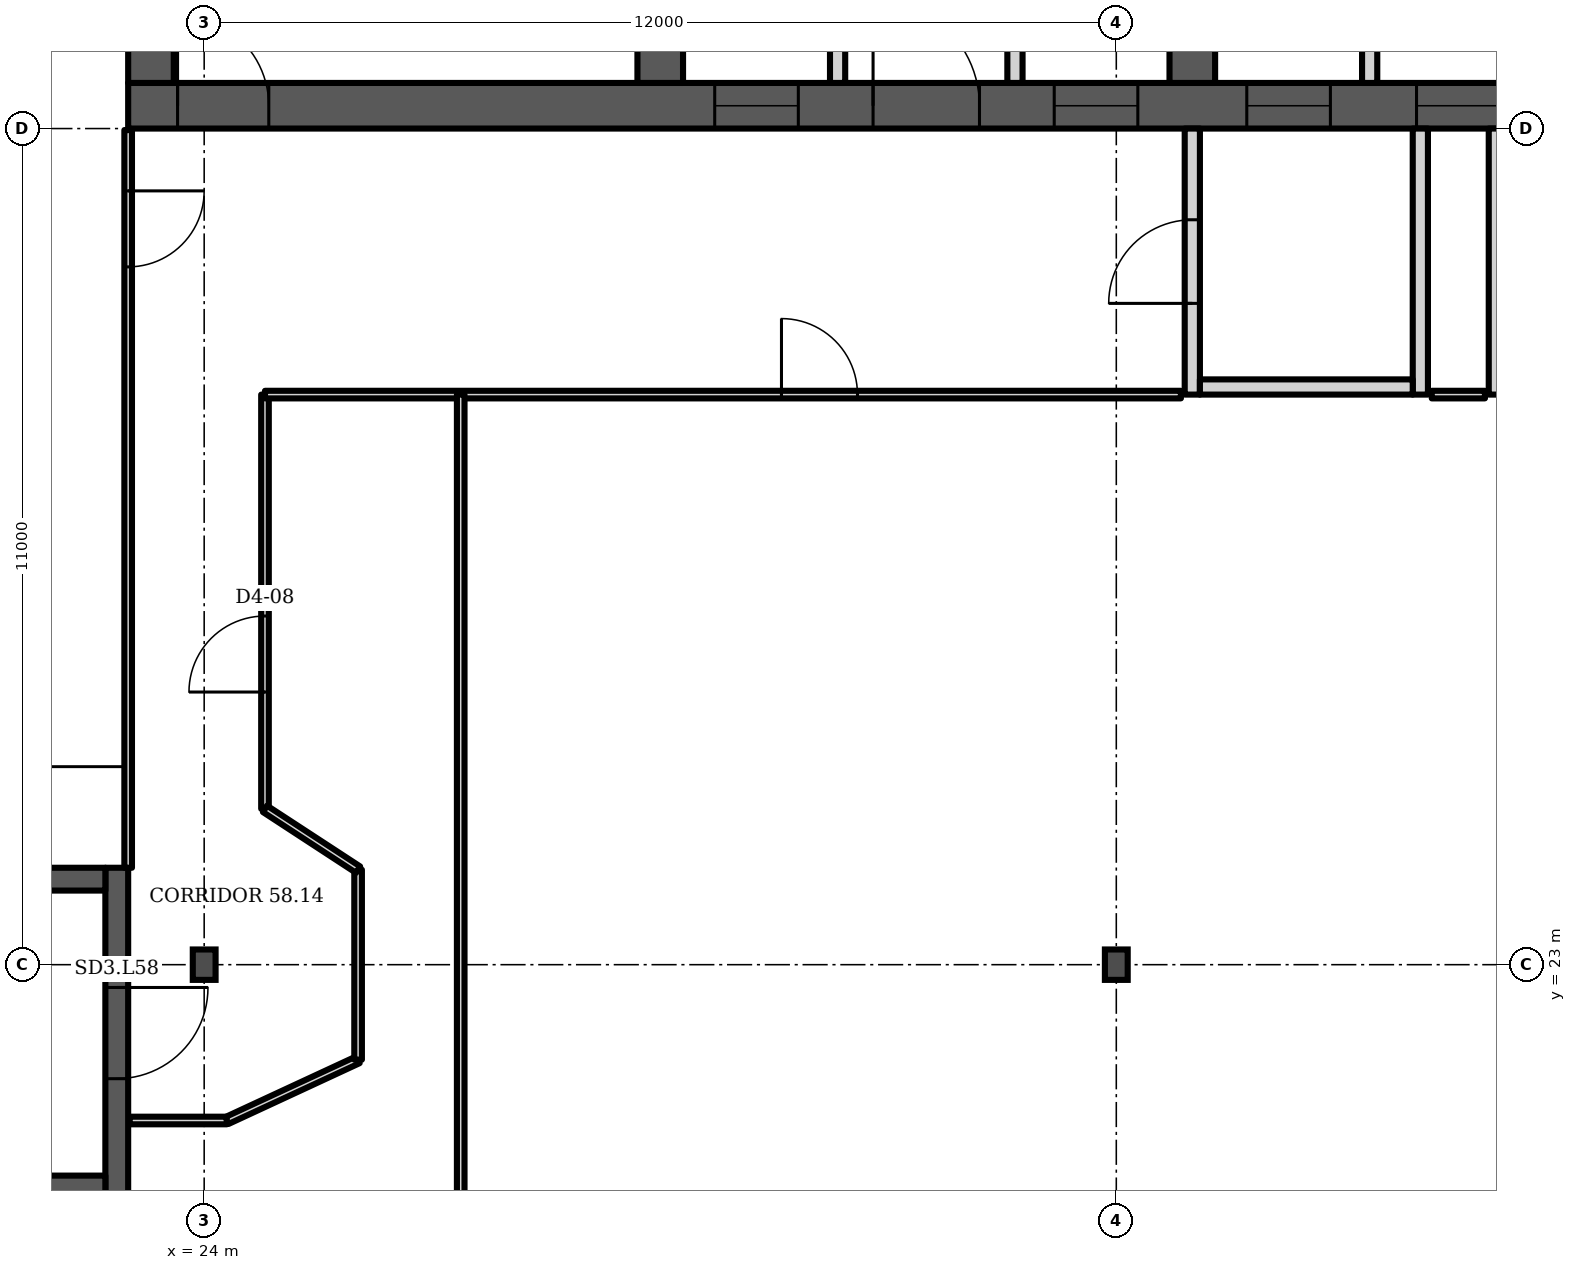
"""IFC4 building model, lengths in metres.
Left out: names, types, materials, properties, quantities, classifications, styles, units other than length and angle.
Written with IfcOpenShell. Run it as: python <this file> out.ifc"""

import sys

from ifc_helpers import new_model, si_unit, direction, frame, frame_2d, origin, origin_2d, place, context, subcontext, project, spatial, polyline, rectangle, i_section, outline, extrude, element, fill, save


model = new_model("IFC4")
c1 = context("Model", 3, precision=1e-05, world=origin(), true_north=direction((0.0, 1.0)))
c2 = subcontext(c1, "Body", "Model", "MODEL_VIEW")
j1 = project(units=[si_unit("LENGTHUNIT", "METRE"), si_unit("PLANEANGLEUNIT", "RADIAN")], contexts=[c1])
p1 = place(None, origin())
s1 = spatial("IfcSite", under=j1, at=p1, CompositionType="ELEMENT")
p2 = place(p1, origin())
s2 = spatial("IfcBuilding", under=s1, at=p2, CompositionType="ELEMENT")
p3 = place(p2, frame((0.0, 0.0, 232.3)))
s3 = spatial("IfcBuildingStorey", under=s2, at=p3, CompositionType="ELEMENT", Elevation=232.3)
p4 = place(p3, frame((23.0, 34.3, 0.0), z_axis=(0.0, 0.0, 1.0), x_axis=(1.0, 0.0, 0.0)))
e1 = element("IfcWall", 1, at=p4, inside=s3, PredefinedType="SHEAR", context=c2, shape_type="SweptSolid", body=[
    extrude(rectangle(XDim=35.0, YDim=0.6, at=frame_2d((17.5, 0.0))), origin(), (0.0, 0.0, 1.0), 3.6),
])
p5 = place(p4, frame((0.65, 0.0, 0.0)))
e2 = element("IfcOpeningElement", 2, at=p5, cuts=e1, PredefinedType="OPENING", context=c2, shape_type="SweptSolid", body=[
    extrude(rectangle(XDim=1.2, YDim=2.1, at=frame_2d((0.6, 1.05))), frame((0.0, 0.31, 0.0), z_axis=(0.0, -1.0, 0.0), x_axis=(1.0, 0.0, 0.0)), (0.0, 0.0, 1.0), 0.62),
])
p6 = place(p4, frame((7.717, 0.0, 0.0)))
e3 = element("IfcOpeningElement", 3, at=p6, cuts=e1, PredefinedType="OPENING", context=c2, shape_type="SweptSolid", body=[
    extrude(rectangle(XDim=1.1, YDim=2.1, at=frame_2d((0.55, 1.05))), frame((0.0, 0.31, 0.0), z_axis=(0.0, -1.0, 0.0), x_axis=(1.0, 0.0, 0.0)), (0.0, 0.0, 1.0), 0.62),
])
p7 = place(p4, frame((12.183, 0.0, 0.0)))
e4 = element("IfcOpeningElement", 4, at=p7, cuts=e1, PredefinedType="OPENING", context=c2, shape_type="SweptSolid", body=[
    extrude(rectangle(XDim=1.1, YDim=2.1, at=frame_2d((0.55, 1.05))), frame((0.0, 0.31, 0.0), z_axis=(0.0, -1.0, 0.0), x_axis=(1.0, 0.0, 0.0)), (0.0, 0.0, 1.0), 0.62),
])
p8 = place(p4, frame((9.8, 0.0, 0.0)))
e5 = element("IfcOpeningElement", 5, at=p8, cuts=e1, PredefinedType="OPENING", context=c2, shape_type="SweptSolid", body=[
    extrude(rectangle(XDim=1.4, YDim=2.1, at=frame_2d((0.7, 1.05))), frame((0.0, 0.31, 0.0), z_axis=(0.0, -1.0, 0.0), x_axis=(1.0, 0.0, 0.0)), (0.0, 0.0, 1.0), 0.62),
])
p9 = place(p4, frame((14.717, 0.0, 0.0)))
e6 = element("IfcOpeningElement", 6, at=p9, cuts=e1, PredefinedType="OPENING", context=c2, shape_type="SweptSolid", body=[
    extrude(rectangle(XDim=1.1, YDim=2.1, at=frame_2d((0.55, 1.05))), frame((0.0, 0.31, 0.0), z_axis=(0.0, -1.0, 0.0), x_axis=(1.0, 0.0, 0.0)), (0.0, 0.0, 1.0), 0.62),
])
p10 = place(p4, frame((16.95, 0.0, 0.0)))
e7 = element("IfcOpeningElement", 7, at=p10, cuts=e1, PredefinedType="OPENING", context=c2, shape_type="SweptSolid", body=[
    extrude(rectangle(XDim=1.1, YDim=2.1, at=frame_2d((0.55, 1.05))), frame((0.0, 0.31, 0.0), z_axis=(0.0, -1.0, 0.0), x_axis=(1.0, 0.0, 0.0)), (0.0, 0.0, 1.0), 0.62),
])
p11 = place(p4, frame((19.183, 0.0, 0.0)))
e8 = element("IfcOpeningElement", 8, at=p11, cuts=e1, PredefinedType="OPENING", context=c2, shape_type="SweptSolid", body=[
    extrude(rectangle(XDim=1.1, YDim=2.1, at=frame_2d((0.55, 1.05))), frame((0.0, 0.31, 0.0), z_axis=(0.0, -1.0, 0.0), x_axis=(1.0, 0.0, 0.0)), (0.0, 0.0, 1.0), 0.62),
])
p12 = place(p4, frame((26.15, 0.0, 0.0)))
e9 = element("IfcOpeningElement", 9, at=p12, cuts=e1, PredefinedType="OPENING", context=c2, shape_type="SweptSolid", body=[
    extrude(rectangle(XDim=1.2, YDim=2.1, at=frame_2d((0.6, 1.05))), frame((0.0, 0.31, 0.0), z_axis=(0.0, -1.0, 0.0), x_axis=(1.0, 0.0, 0.0)), (0.0, 0.0, 1.0), 0.62),
])
p13 = place(p4, frame((28.767, 0.0, 0.0)))
e10 = element("IfcOpeningElement", 10, at=p13, cuts=e1, PredefinedType="OPENING", context=c2, shape_type="SweptSolid", body=[
    extrude(rectangle(XDim=1.0, YDim=2.1, at=frame_2d((0.5, 1.05))), frame((0.0, 0.31, 0.0), z_axis=(0.0, -1.0, 0.0), x_axis=(1.0, 0.0, 0.0)), (0.0, 0.0, 1.0), 0.62),
])
p14 = place(p4, frame((33.083, 0.0, 0.0)))
e11 = element("IfcOpeningElement", 11, at=p14, cuts=e1, PredefinedType="OPENING", context=c2, shape_type="SweptSolid", body=[
    extrude(rectangle(XDim=1.0, YDim=2.1, at=frame_2d((0.5, 1.05))), frame((0.0, 0.31, 0.0), z_axis=(0.0, -1.0, 0.0), x_axis=(1.0, 0.0, 0.0)), (0.0, 0.0, 1.0), 0.62),
])
p15 = place(p4, frame((30.8, 0.0, 0.0)))
e12 = element("IfcOpeningElement", 12, at=p15, cuts=e1, PredefinedType="OPENING", context=c2, shape_type="SweptSolid", body=[
    extrude(rectangle(XDim=1.4, YDim=2.1, at=frame_2d((0.7, 1.05))), frame((0.0, 0.31, 0.0), z_axis=(0.0, -1.0, 0.0), x_axis=(1.0, 0.0, 0.0)), (0.0, 0.0, 1.0), 0.62),
])
p16 = place(p3, frame((23.3, 34.6, 0.0), z_axis=(0.0, 0.0, 1.0), x_axis=(0.0, 1.0, 0.0)))
e13 = element("IfcWall", 13, at=p16, inside=s3, PredefinedType="SHEAR", context=c2, shape_type="SweptSolid", body=[
    extrude(rectangle(XDim=13.585, YDim=0.6, at=frame_2d((6.792, 0.0))), origin(), (0.0, 0.0, 1.0), 3.6),
])
p17 = place(p3, frame((30.0, 34.6, 0.0), z_axis=(0.0, 0.0, 1.0), x_axis=(0.0, 1.0, 0.0)))
e14 = element("IfcWall", 14, at=p17, inside=s3, PredefinedType="SHEAR", context=c2, shape_type="SweptSolid", body=[
    extrude(rectangle(XDim=14.171, YDim=0.6, at=frame_2d((7.085, 0.0))), origin(), (0.0, 0.0, 1.0), 3.6),
])
p18 = place(p17, frame((3.8, 0.0, 0.0)))
e15 = element("IfcOpeningElement", 15, at=p18, cuts=e14, PredefinedType="OPENING", context=c2, shape_type="SweptSolid", body=[
    extrude(rectangle(XDim=1.1, YDim=2.1, at=frame_2d((0.55, 1.05))), frame((0.0, 0.31, 0.0), z_axis=(0.0, -1.0, 0.0), x_axis=(1.0, 0.0, 0.0)), (0.0, 0.0, 1.0), 0.62),
])
p19 = place(p3, frame((37.0, 34.6, 0.0), z_axis=(0.0, 0.0, 1.0), x_axis=(0.0, 1.0, 0.0)))
e16 = element("IfcWall", 16, at=p19, inside=s3, PredefinedType="SHEAR", context=c2, shape_type="SweptSolid", body=[
    extrude(rectangle(XDim=14.784, YDim=0.6, at=frame_2d((7.392, 0.0))), origin(), (0.0, 0.0, 1.0), 3.6),
])
p20 = place(p19, frame((11.302, 0.0, 0.0)))
e17 = element("IfcOpeningElement", 17, at=p20, cuts=e16, PredefinedType="OPENING", context=c2, shape_type="SweptSolid", body=[
    extrude(rectangle(XDim=1.0, YDim=2.1, at=frame_2d((0.5, 1.05))), frame((0.0, 0.31, 0.0), z_axis=(0.0, -1.0, 0.0), x_axis=(1.0, 0.0, 0.0)), (0.0, 0.0, 1.0), 0.62),
])
p21 = place(p19, frame((3.8, 0.0, 0.0)))
e18 = element("IfcOpeningElement", 18, at=p21, cuts=e16, PredefinedType="OPENING", context=c2, shape_type="SweptSolid", body=[
    extrude(rectangle(XDim=1.1, YDim=2.1, at=frame_2d((0.55, 1.05))), frame((0.0, 0.31, 0.0), z_axis=(0.0, -1.0, 0.0), x_axis=(1.0, 0.0, 0.0)), (0.0, 0.0, 1.0), 0.62),
])
for number, where, z_axis, x_axis in (
    (19, (24.0, 23.0, 0.0), (0.0, 0.0, 1.0), (1.0, 0.0, 0.0)),
    (20, (36.0, 23.0, 0.0), (0.0, 0.0, 1.0), (1.0, 0.0, 0.0)),
):
    element("IfcColumn", number, at=place(p3, frame(where, z_axis=z_axis, x_axis=x_axis)), inside=s3, PredefinedType="COLUMN", context=c2, shape_type="SweptSolid", body=[
        extrude(i_section(OverallWidth=0.3, OverallDepth=0.4, WebThickness=0.013, FlangeThickness=0.024, FilletRadius=0.027, at=origin_2d()), origin(), (0.0, 0.0, 1.0), 3.6),
    ])
p22 = place(p3, frame((0.0, 0.0, -0.0)))
e21 = element("IfcWall", 21, at=p22, inside=s3, PredefinedType="PARTITIONING", context=c2, shape_type="SweptSolid", body=[
    extrude(outline(polyline([(32.233, 37.45), (30.3, 37.45), (30.3, 37.65), (32.233, 37.65), (32.433, 37.65), (32.433, 34.6), (32.233, 34.6), (32.233, 37.45)])), origin(), (0.0, 0.0, 1.0), 3.2),
])
p23 = place(p3, frame((0.0, 0.0, -0.0)))
e22 = element("IfcWall", 22, at=p23, inside=s3, PredefinedType="PARTITIONING", context=c2, shape_type="SweptSolid", body=[
    extrude(outline(polyline([(34.567, 37.65), (34.767, 37.65), (36.7, 37.65), (36.7, 37.45), (34.767, 37.45), (34.767, 34.6), (34.567, 34.6), (34.567, 37.65)])), origin(), (0.0, 0.0, 1.0), 3.2),
])
p24 = place(p3, frame((0.0, 0.0, -0.0)))
e23 = element("IfcWall", 23, at=p24, inside=s3, PredefinedType="PARTITIONING", context=c2, shape_type="SweptSolid", body=[
    extrude(outline(polyline([(41.567, 37.1), (39.433, 37.1), (39.433, 34.6), (39.233, 34.6), (39.233, 37.45), (37.3, 37.45), (37.3, 37.65), (39.233, 37.65), (39.433, 37.65), (39.433, 37.3), (41.567, 37.3), (41.567, 37.35), (41.767, 37.35), (43.7, 37.35), (43.7, 37.15), (41.767, 37.15), (41.767, 34.6), (41.567, 34.6), (41.567, 37.1)])), origin(), (0.0, 0.0, 1.0), 3.2),
])
p25 = place(p3, frame((37.0, 30.5, 0.0), z_axis=(0.0, 0.0, 1.0), x_axis=(0.0, 1.0, 0.0)))
e24 = element("IfcWall", 24, at=p25, inside=s3, PredefinedType="PARTITIONING", context=c2, shape_type="SweptSolid", body=[
    extrude(rectangle(XDim=3.5, YDim=0.2, at=frame_2d((1.75, 0.0))), origin(), (0.0, 0.0, 1.0), 3.2),
])
p26 = place(p25, frame((1.2, 0.0, 0.0)))
e25 = element("IfcOpeningElement", 25, at=p26, cuts=e24, PredefinedType="OPENING", context=c2, shape_type="SweptSolid", body=[
    extrude(rectangle(XDim=1.1, YDim=2.1, at=frame_2d((0.55, 1.05))), frame((0.0, 0.11, 0.0), z_axis=(0.0, -1.0, 0.0), x_axis=(1.0, 0.0, 0.0)), (0.0, 0.0, 1.0), 0.22),
])
p27 = place(p3, frame((40.0, 30.5, 0.0), z_axis=(0.0, 0.0, 1.0), x_axis=(0.0, 1.0, 0.0)))
e26 = element("IfcWall", 26, at=p27, inside=s3, PredefinedType="PARTITIONING", context=c2, shape_type="SweptSolid", body=[
    extrude(rectangle(XDim=3.5, YDim=0.2, at=frame_2d((1.75, 0.0))), origin(), (0.0, 0.0, 1.0), 3.2),
])
p28 = place(p3, frame((37.1, 30.6, 0.0), z_axis=(0.0, 0.0, 1.0), x_axis=(1.0, 0.0, 0.0)))
e27 = element("IfcWall", 27, at=p28, inside=s3, PredefinedType="PARTITIONING", context=c2, shape_type="SweptSolid", body=[
    extrude(rectangle(XDim=2.8, YDim=0.2, at=frame_2d((1.4, 0.0))), origin(), (0.0, 0.0, 1.0), 3.2),
])
p29 = place(p3, frame((41.0, 30.5, 0.0), z_axis=(0.0, 0.0, 1.0), x_axis=(0.0, 1.0, 0.0)))
e28 = element("IfcWall", 28, at=p29, inside=s3, PredefinedType="PARTITIONING", context=c2, shape_type="SweptSolid", body=[
    extrude(rectangle(XDim=3.5, YDim=0.2, at=frame_2d((1.75, 0.0))), origin(), (0.0, 0.0, 1.0), 3.2),
])
p30 = place(p3, frame((22.85, 19.925, 0.0), z_axis=(0.0, 0.0, 1.0), x_axis=(0.0, 1.0, 0.0)))
e29 = element("IfcWall", 29, at=p30, inside=s3, PredefinedType="SHEAR", context=c2, shape_type="SweptSolid", body=[
    extrude(rectangle(XDim=4.35, YDim=0.3, at=frame_2d((2.175, 0.0))), origin(), (0.0, 0.0, 1.0), 3.2),
])
p31 = place(p30, frame((1.575, 0.0, 0.0)))
e30 = element("IfcOpeningElement", 30, at=p31, cuts=e29, PredefinedType="OPENING", context=c2, shape_type="SweptSolid", body=[
    extrude(rectangle(XDim=1.2, YDim=2.1, at=frame_2d((0.6, 1.05))), frame((0.0, 0.16, 0.0), z_axis=(0.0, -1.0, 0.0), x_axis=(1.0, 0.0, 0.0)), (0.0, 0.0, 1.0), 0.32),
])
p32 = place(p3, frame((23.0, 24.275, 0.0), z_axis=(0.0, 0.0, 1.0), x_axis=(0.0, 1.0, 0.0)))
e31 = element("IfcWall", 31, at=p32, inside=s3, PredefinedType="PARTITIONING", context=c2, shape_type="SweptSolid", body=[
    extrude(rectangle(XDim=9.705, YDim=0.1, at=frame_2d((4.853, 0.0))), origin(), (0.0, 0.0, 1.0), 3.2),
])
p33 = place(p32, frame((7.905, 0.0, 0.0)))
e32 = element("IfcOpeningElement", 32, at=p33, cuts=e31, PredefinedType="OPENING", context=c2, shape_type="SweptSolid", body=[
    extrude(rectangle(XDim=1.0, YDim=2.1, at=frame_2d((0.5, 1.05))), frame((0.0, 0.06, 0.0), z_axis=(0.0, -1.0, 0.0), x_axis=(1.0, 0.0, 0.0)), (0.0, 0.0, 1.0), 0.12),
])
p34 = place(p3, frame((23.02, 20.95, 0.0), z_axis=(0.0, 0.0, 1.0), x_axis=(1.0, 0.0, 0.0)))
e33 = element("IfcWall", 33, at=p34, inside=s3, PredefinedType="PARTITIONING", context=c2, shape_type="SweptSolid", body=[
    extrude(rectangle(XDim=1.28, YDim=0.1, at=frame_2d((0.64, 0.0))), origin(), (0.0, 0.0, 1.0), 3.2),
])
p35 = place(p3, frame((24.3, 20.95, 0.0), z_axis=(0.0, 0.0, 1.0), x_axis=(0.907168, 0.420777, 0.0)))
e34 = element("IfcWall", 34, at=p35, inside=s3, PredefinedType="PARTITIONING", context=c2, shape_type="SweptSolid", body=[
    extrude(rectangle(XDim=1.901, YDim=0.1, at=frame_2d((0.951, 0.0))), origin(), (0.0, 0.0, 1.0), 3.2),
])
p36 = place(p3, frame((24.8, 25.05, 0.0), z_axis=(0.0, 0.0, 1.0), x_axis=(0.0, 1.0, 0.0)))
e35 = element("IfcWall", 35, at=p36, inside=s3, PredefinedType="PARTITIONING", context=c2, shape_type="SweptSolid", body=[
    extrude(rectangle(XDim=5.45, YDim=0.1, at=frame_2d((2.725, 0.0))), origin(), (0.0, 0.0, 1.0), 3.2),
])
p37 = place(p36, frame((1.537, 0.0, 0.0)))
e36 = element("IfcOpeningElement", 36, at=p37, cuts=e35, PredefinedType="OPENING", context=c2, shape_type="SweptSolid", body=[
    extrude(rectangle(XDim=1.0, YDim=2.1, at=frame_2d((0.5, 1.05))), frame((0.0, 0.06, 0.0), z_axis=(0.0, -1.0, 0.0), x_axis=(1.0, 0.0, 0.0)), (0.0, 0.0, 1.0), 0.12),
])
p38 = place(p3, frame((24.8, 30.5, 0.0), z_axis=(0.0, 0.0, 1.0), x_axis=(1.0, 0.0, 0.0)))
e37 = element("IfcWall", 37, at=p38, inside=s3, PredefinedType="PARTITIONING", context=c2, shape_type="SweptSolid", body=[
    extrude(rectangle(XDim=12.05, YDim=0.1, at=frame_2d((6.025, 0.0))), origin(), (0.0, 0.0, 1.0), 3.2),
])
p39 = place(p38, frame((6.795, 0.0, 0.0)))
e38 = element("IfcOpeningElement", 38, at=p39, cuts=e37, PredefinedType="OPENING", context=c2, shape_type="SweptSolid", body=[
    extrude(rectangle(XDim=1.0, YDim=2.1, at=frame_2d((0.5, 1.05))), frame((0.0, 0.06, 0.0), z_axis=(0.0, -1.0, 0.0), x_axis=(1.0, 0.0, 0.0)), (0.0, 0.0, 1.0), 0.12),
])
p40 = place(p3, frame((26.025, 21.75, 0.0), z_axis=(0.0, 0.0, 1.0), x_axis=(0.0, 1.0, 0.0)))
e39 = element("IfcWall", 39, at=p40, inside=s3, PredefinedType="PARTITIONING", context=c2, shape_type="SweptSolid", body=[
    extrude(rectangle(XDim=2.5, YDim=0.1, at=frame_2d((1.25, 0.0))), origin(), (0.0, 0.0, 1.0), 3.2),
])
p41 = place(p3, frame((26.025, 24.25, 0.0), z_axis=(0.0, 0.0, 1.0), x_axis=(-0.837222, 0.546856, 0.0)))
e40 = element("IfcWall", 40, at=p41, inside=s3, PredefinedType="PARTITIONING", context=c2, shape_type="SweptSolid", body=[
    extrude(rectangle(XDim=1.463, YDim=0.1, at=frame_2d((0.731, 0.0))), origin(), (0.0, 0.0, 1.0), 3.2),
])
p42 = place(p3, frame((27.375, 5.915, 0.0), z_axis=(0.0, 0.0, 1.0), x_axis=(0.0, 1.0, 0.0)))
e41 = element("IfcWall", 41, at=p42, inside=s3, PredefinedType="PARTITIONING", context=c2, shape_type="SweptSolid", body=[
    extrude(rectangle(XDim=24.585, YDim=0.1, at=frame_2d((12.292, 0.0))), origin(), (0.0, 0.0, 1.0), 3.2),
])
p43 = place(p3, frame((40.15, 30.5, 0.0), z_axis=(0.0, 0.0, 1.0), x_axis=(1.0, 0.0, 0.0)))
e42 = element("IfcWall", 42, at=p43, inside=s3, PredefinedType="PARTITIONING", context=c2, shape_type="SweptSolid", body=[
    extrude(rectangle(XDim=0.7, YDim=0.1, at=frame_2d((0.35, 0.0))), origin(), (0.0, 0.0, 1.0), 3.2),
])
for number, where, z_axis, x_axis in (
    (43, (15.2, 20.075, 0.0), (0.0, 0.0, 1.0), (1.0, 0.0, 0.0)),
    (44, (15.2, 24.125, 0.0), (0.0, 0.0, 1.0), (1.0, 0.0, 0.0)),
):
    element("IfcWall", number, at=place(p3, frame(where, z_axis=z_axis, x_axis=x_axis)), inside=s3, PredefinedType="SHEAR", context=c2, shape_type="SweptSolid", body=[
        extrude(rectangle(XDim=7.5, YDim=0.3, at=frame_2d((3.75, 0.0))), origin(), (0.0, 0.0, 1.0), 3.2),
    ])
p44 = place(p5, origin())
e45 = element("IfcDoor", 45, at=p44, inside=s3, OperationType="SINGLE_SWING_LEFT", PredefinedType="DOOR", context=c2, shape_type="SweptSolid", body=[
    extrude(rectangle(XDim=1.2, YDim=2.1, at=frame_2d((0.6, 1.05))), frame((0.0, 0.025, 0.0), z_axis=(0.0, -1.0, 0.0), x_axis=(1.0, 0.0, 0.0)), (0.0, 0.0, 1.0), 0.05),
])
fill(e2, e45)
p45 = place(p6, origin())
e46 = element("IfcDoor", 46, at=p45, inside=s3, OperationType="DOUBLE_DOOR_SLIDING", PredefinedType="DOOR", context=c2, shape_type="SweptSolid", body=[
    extrude(rectangle(XDim=1.1, YDim=2.1, at=frame_2d((0.55, 1.05))), frame((0.0, 0.025, 0.0), z_axis=(0.0, -1.0, 0.0), x_axis=(1.0, 0.0, 0.0)), (0.0, 0.0, 1.0), 0.05),
])
fill(e3, e46)
p46 = place(p7, origin())
e47 = element("IfcDoor", 47, at=p46, inside=s3, OperationType="DOUBLE_DOOR_SLIDING", PredefinedType="DOOR", context=c2, shape_type="SweptSolid", body=[
    extrude(rectangle(XDim=1.1, YDim=2.1, at=frame_2d((0.55, 1.05))), frame((0.0, 0.025, 0.0), z_axis=(0.0, -1.0, 0.0), x_axis=(1.0, 0.0, 0.0)), (0.0, 0.0, 1.0), 0.05),
])
fill(e4, e47)
p47 = place(p8, origin())
e48 = element("IfcDoor", 48, at=p47, inside=s3, OperationType="DOUBLE_DOOR_SINGLE_SWING", PredefinedType="DOOR", context=c2, shape_type="SweptSolid", body=[
    extrude(rectangle(XDim=1.4, YDim=2.1, at=frame_2d((0.7, 1.05))), frame((0.0, 0.025, 0.0), z_axis=(0.0, -1.0, 0.0), x_axis=(1.0, 0.0, 0.0)), (0.0, 0.0, 1.0), 0.05),
])
fill(e5, e48)
p48 = place(p9, origin())
e49 = element("IfcDoor", 49, at=p48, inside=s3, OperationType="DOUBLE_DOOR_SLIDING", PredefinedType="DOOR", context=c2, shape_type="SweptSolid", body=[
    extrude(rectangle(XDim=1.1, YDim=2.1, at=frame_2d((0.55, 1.05))), frame((0.0, 0.025, 0.0), z_axis=(0.0, -1.0, 0.0), x_axis=(1.0, 0.0, 0.0)), (0.0, 0.0, 1.0), 0.05),
])
fill(e6, e49)
p49 = place(p10, origin())
e50 = element("IfcDoor", 50, at=p49, inside=s3, OperationType="DOUBLE_DOOR_SLIDING", PredefinedType="DOOR", context=c2, shape_type="SweptSolid", body=[
    extrude(rectangle(XDim=1.1, YDim=2.1, at=frame_2d((0.55, 1.05))), frame((0.0, 0.025, 0.0), z_axis=(0.0, -1.0, 0.0), x_axis=(1.0, 0.0, 0.0)), (0.0, 0.0, 1.0), 0.05),
])
fill(e7, e50)
p50 = place(p26, origin())
e51 = element("IfcDoor", 51, at=p50, inside=s3, OperationType="SINGLE_SWING_LEFT", PredefinedType="DOOR", context=c2, shape_type="SweptSolid", body=[
    extrude(rectangle(XDim=1.1, YDim=2.1, at=frame_2d((0.55, 1.05))), frame((0.0, 0.025, 0.0), z_axis=(0.0, -1.0, 0.0), x_axis=(1.0, 0.0, 0.0)), (0.0, 0.0, 1.0), 0.05),
])
fill(e25, e51)
p51 = place(p31, origin())
e52 = element("IfcDoor", 52, at=p51, inside=s3, OperationType="SINGLE_SWING_RIGHT", PredefinedType="DOOR", context=c2, shape_type="SweptSolid", body=[
    extrude(rectangle(XDim=1.2, YDim=2.1, at=frame_2d((0.6, 1.05))), frame((0.0, 0.025, 0.0), z_axis=(0.0, -1.0, 0.0), x_axis=(1.0, 0.0, 0.0)), (0.0, 0.0, 1.0), 0.05),
])
fill(e30, e52)
p52 = place(p37, origin())
e53 = element("IfcDoor", 53, at=p52, inside=s3, OperationType="SINGLE_SWING_LEFT", PredefinedType="DOOR", context=c2, shape_type="SweptSolid", body=[
    extrude(rectangle(XDim=1.0, YDim=2.1, at=frame_2d((0.5, 1.05))), frame((0.0, 0.025, 0.0), z_axis=(0.0, -1.0, 0.0), x_axis=(1.0, 0.0, 0.0)), (0.0, 0.0, 1.0), 0.05),
])
fill(e36, e53)
p53 = place(p39, origin())
e54 = element("IfcDoor", 54, at=p53, inside=s3, OperationType="SINGLE_SWING_LEFT", PredefinedType="DOOR", context=c2, shape_type="SweptSolid", body=[
    extrude(rectangle(XDim=1.0, YDim=2.1, at=frame_2d((0.5, 1.05))), frame((0.0, 0.025, 0.0), z_axis=(0.0, -1.0, 0.0), x_axis=(1.0, 0.0, 0.0)), (0.0, 0.0, 1.0), 0.05),
])
fill(e38, e54)
p54 = place(p33, origin())
e55 = element("IfcDoor", 55, at=p54, inside=s3, OperationType="SINGLE_SWING_RIGHT", PredefinedType="DOOR", context=c2, shape_type="SweptSolid", body=[
    extrude(rectangle(XDim=1.0, YDim=2.1, at=frame_2d((0.5, 1.05))), frame((0.0, 0.025, 0.0), z_axis=(0.0, -1.0, 0.0), x_axis=(1.0, 0.0, 0.0)), (0.0, 0.0, 1.0), 0.05),
])
fill(e32, e55)
save(model, sys.argv[1])
